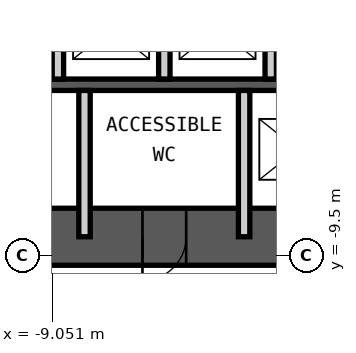
"""IFC4 building model, lengths in metres.
Left out: names, types, materials, properties, quantities, classifications, styles, units other than length and angle.
Written with IfcOpenShell. Run it as: python <this file> out.ifc"""

import sys

from ifc_helpers import new_model, si_unit, direction, frame, frame_2d, origin, place, context, subcontext, project, spatial, rectangle, extrude, element, fill, save


model = new_model("IFC4")
c1 = context("Model", 3, precision=1e-05, world=origin(), true_north=direction((0.0, 1.0)))
c2 = subcontext(c1, "Body", "Model", "MODEL_VIEW")
j1 = project(units=[si_unit("LENGTHUNIT", "METRE"), si_unit("PLANEANGLEUNIT", "RADIAN")], contexts=[c1])
p1 = place(None, origin())
s1 = spatial("IfcSite", under=j1, at=p1, CompositionType="ELEMENT")
p2 = place(p1, origin())
s2 = spatial("IfcBuilding", under=s1, at=p2, CompositionType="ELEMENT")
p3 = place(p2, frame((0.0, 0.0, 87.0)))
s3 = spatial("IfcBuildingStorey", under=s2, at=p3, CompositionType="ELEMENT", Elevation=87.0)
p4 = place(p3, frame((-12.0, -9.0, 0.0), z_axis=(0.0, 0.0, 1.0), x_axis=(1.0, 0.0, 0.0)))
e1 = element("IfcWall", 1, at=p4, inside=s3, PredefinedType="SHEAR", context=c2, shape_type="SweptSolid", body=[
    extrude(rectangle(XDim=24.0, YDim=1.5, at=frame_2d((12.0, 0.0))), origin(), (0.0, 0.0, 1.0), 5.0),
])
p5 = place(p4, frame((1.35, 0.0, 0.0)))
e2 = element("IfcOpeningElement", 2, at=p5, cuts=e1, PredefinedType="OPENING", context=c2, shape_type="SweptSolid", body=[
    extrude(rectangle(XDim=1.0, YDim=2.1, at=frame_2d((0.5, 1.05))), frame((0.0, 0.76, 0.0), z_axis=(0.0, -1.0, 0.0), x_axis=(1.0, 0.0, 0.0)), (0.0, 0.0, 1.0), 1.52),
])
p6 = place(p4, frame((5.325, 0.0, 0.0)))
e3 = element("IfcOpeningElement", 3, at=p6, cuts=e1, PredefinedType="OPENING", context=c2, shape_type="SweptSolid", body=[
    extrude(rectangle(XDim=1.15, YDim=2.1, at=frame_2d((0.575, 1.05))), frame((0.0, 0.76, 0.0), z_axis=(0.0, -1.0, 0.0), x_axis=(1.0, 0.0, 0.0)), (0.0, 0.0, 1.0), 1.52),
])
p7 = place(p4, frame((12.6, 0.0, 0.0)))
e4 = element("IfcOpeningElement", 4, at=p7, cuts=e1, PredefinedType="OPENING", context=c2, shape_type="SweptSolid", body=[
    extrude(rectangle(XDim=1.0, YDim=2.1, at=frame_2d((0.5, 1.05))), frame((0.0, 0.76, 0.0), z_axis=(0.0, -1.0, 0.0), x_axis=(1.0, 0.0, 0.0)), (0.0, 0.0, 1.0), 1.52),
])
p8 = place(p3, frame((-12.0, -5.0, 0.0), z_axis=(0.0, 0.0, 1.0), x_axis=(1.0, 0.0, 0.0)))
e5 = element("IfcWall", 5, at=p8, inside=s3, PredefinedType="SHEAR", context=c2, shape_type="SweptSolid", body=[
    extrude(rectangle(XDim=24.0, YDim=0.3, at=frame_2d((12.0, 0.0))), origin(), (0.0, 0.0, 1.0), 5.0),
])
for number, where, z_axis, x_axis in (
    (6, (-8.9, -4.85, 0.0), (0.0, 0.0, 1.0), (0.0, 1.0, 0.0)),
    (7, (-6.1, -4.85, 0.0), (0.0, 0.0, 1.0), (0.0, 1.0, 0.0)),
    (8, (-3.3, -4.85, 0.0), (0.0, 0.0, 1.0), (0.0, 1.0, 0.0)),
):
    element("IfcWall", number, at=place(p3, frame(where, z_axis=z_axis, x_axis=x_axis)), inside=s3, PredefinedType="PARTITIONING", context=c2, shape_type="SweptSolid", body=[
        extrude(rectangle(XDim=2.65, YDim=0.3, at=frame_2d((1.325, 0.0))), origin(), (0.0, 0.0, 1.0), 4.78),
    ])
for number, where, z_axis, x_axis in (
    (9, (-8.2, -9.0, 0.0), (0.0, 0.0, 1.0), (0.0, 1.0, 0.0)),
    (10, (-4.0, -9.0, 0.0), (0.0, 0.0, 1.0), (0.0, 1.0, 0.0)),
):
    element("IfcWall", number, at=place(p3, frame(where, z_axis=z_axis, x_axis=x_axis)), inside=s3, PredefinedType="PARTITIONING", context=c2, shape_type="SweptSolid", body=[
        extrude(rectangle(XDim=3.85, YDim=0.3, at=frame_2d((1.925, 0.0))), origin(), (0.0, 0.0, 1.0), 4.78),
    ])
p9 = place(p6, origin())
e11 = element("IfcDoor", 11, at=p9, inside=s3, OperationType="SINGLE_SWING_LEFT", PredefinedType="DOOR", context=c2, shape_type="SweptSolid", body=[
    extrude(rectangle(XDim=1.15, YDim=2.1, at=frame_2d((0.575, 1.05))), frame((0.0, 0.025, 0.0), z_axis=(0.0, -1.0, 0.0), x_axis=(1.0, 0.0, 0.0)), (0.0, 0.0, 1.0), 0.05),
])
fill(e3, e11)
save(model, sys.argv[1])
